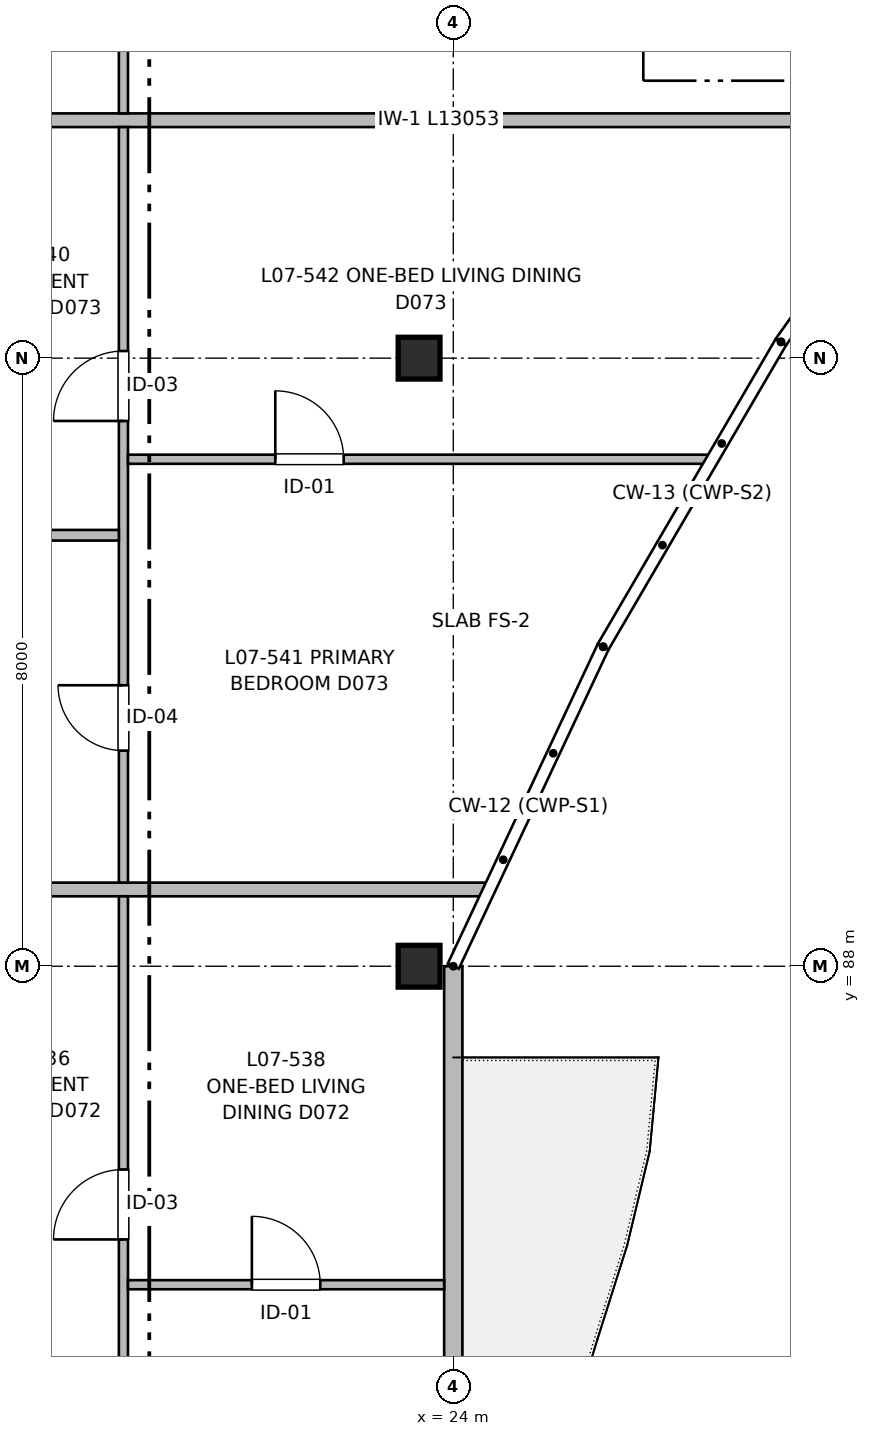
"""IFC4 building model, lengths in metres.
Left out: names, types, materials, properties, quantities, classifications, styles, units other than length and angle.
Written with IfcOpenShell. Run it as: python <this file> out.ifc"""

import sys

from ifc_helpers import new_model, si_unit, direction, frame, frame_2d, origin, origin_2d, place, context, subcontext, project, spatial, rectangle, extrude, element, fill, save


model = new_model("IFC4")
c1 = context("Model", 3, precision=1e-05, world=origin(), true_north=direction((0.0, 1.0)))
c2 = subcontext(c1, "Body", "Model", "MODEL_VIEW")
j1 = project(units=[si_unit("LENGTHUNIT", "METRE"), si_unit("PLANEANGLEUNIT", "RADIAN")], contexts=[c1])
p1 = place(None, origin())
s1 = spatial("IfcSite", under=j1, at=p1, CompositionType="ELEMENT")
p2 = place(p1, origin())
s2 = spatial("IfcBuilding", under=s1, at=p2, CompositionType="ELEMENT")
p3 = place(p2, frame((0.0, 0.0, 23.36)))
s3 = spatial("IfcBuildingStorey", under=s2, at=p3, CompositionType="ELEMENT", Elevation=23.36)
for number, where, z_axis, x_axis in (
    (1, (23.55, 88.0, 0.0), (0.0, 0.0, 1.0), (1.0, 0.0, 0.0)),
    (2, (23.55, 96.0, 0.0), (0.0, 0.0, 1.0), (1.0, 0.0, 0.0)),
):
    element("IfcColumn", number, at=place(p3, frame(where, z_axis=z_axis, x_axis=x_axis)), inside=s3, PredefinedType="COLUMN", context=c2, shape_type="SweptSolid", body=[
        extrude(rectangle(XDim=0.55, YDim=0.55, at=origin_2d()), origin(), (0.0, 0.0, 1.0), 3.2),
    ])
p4 = place(p3, frame((24.0, 88.0, 0.0), z_axis=(0.0, 0.0, 1.0), x_axis=(0.0, -1.0, 0.0)))
e3 = element("IfcWall", 3, at=p4, inside=s3, PredefinedType="SOLIDWALL", context=c2, shape_type="SweptSolid", body=[
    extrude(rectangle(XDim=23.6, YDim=0.24, at=frame_2d((11.8, 0.0))), origin(), (0.0, 0.0, 1.0), 2.98),
])
p5 = place(p4, frame((5.3, 0.0, 0.0)))
e4 = element("IfcOpeningElement", 4, at=p5, cuts=e3, PredefinedType="OPENING", context=c2, shape_type="SweptSolid", body=[
    extrude(rectangle(XDim=1.2, YDim=2.2, at=frame_2d((0.6, 1.1))), frame((0.0, 0.13, 0.0), z_axis=(0.0, -1.0, 0.0), x_axis=(1.0, 0.0, 0.0)), (0.0, 0.0, 1.0), 0.26),
])
p6 = place(p4, frame((7.2, 0.0, 0.67)))
e5 = element("IfcOpeningElement", 5, at=p6, cuts=e3, PredefinedType="OPENING", context=c2, shape_type="SweptSolid", body=[
    extrude(rectangle(XDim=2.6, YDim=1.55, at=frame_2d((1.3, 0.775))), frame((0.0, 0.13, 0.0), z_axis=(0.0, -1.0, 0.0), x_axis=(1.0, 0.0, 0.0)), (0.0, 0.0, 1.0), 0.26),
])
p7 = place(p4, frame((17.15, 0.0, 0.62)))
e6 = element("IfcOpeningElement", 6, at=p7, cuts=e3, PredefinedType="OPENING", context=c2, shape_type="SweptSolid", body=[
    extrude(rectangle(XDim=1.1, YDim=1.6, at=frame_2d((0.55, 0.8))), frame((0.0, 0.13, 0.0), z_axis=(0.0, -1.0, 0.0), x_axis=(1.0, 0.0, 0.0)), (0.0, 0.0, 1.0), 0.26),
])
p8 = place(p4, frame((11.925, 0.0, 0.82)))
e7 = element("IfcOpeningElement", 7, at=p8, cuts=e3, PredefinedType="OPENING", context=c2, shape_type="SweptSolid", body=[
    extrude(rectangle(XDim=1.5, YDim=1.4, at=frame_2d((0.75, 0.7))), frame((0.0, 0.13, 0.0), z_axis=(0.0, -1.0, 0.0), x_axis=(1.0, 0.0, 0.0)), (0.0, 0.0, 1.0), 0.26),
])
p9 = place(p3, frame((17.28, 89.01, 0.0), z_axis=(0.0, 0.0, 1.0), x_axis=(1.0, 0.0, 0.0)))
e8 = element("IfcWall", 8, at=p9, inside=s3, PredefinedType="PARTITIONING", context=c2, shape_type="SweptSolid", body=[
    extrude(rectangle(XDim=7.15, YDim=0.18, at=frame_2d((3.575, 0.0))), origin(), (0.0, 0.0, 1.0), 2.935),
])
p10 = place(p3, frame((17.28, 99.13, 0.0), z_axis=(0.0, 0.0, 1.0), x_axis=(1.0, 0.0, 0.0)))
e9 = element("IfcWall", 9, at=p10, inside=s3, PredefinedType="PARTITIONING", context=c2, shape_type="SweptSolid", body=[
    extrude(rectangle(XDim=13.053, YDim=0.18, at=frame_2d((6.527, 0.0))), origin(), (0.0, 0.0, 1.0), 2.935),
])
p11 = place(p3, frame((19.66, 77.3, 0.0), z_axis=(0.0, 0.0, 1.0), x_axis=(0.0, 1.0, 0.0)))
e10 = element("IfcWall", 10, at=p11, inside=s3, PredefinedType="PARTITIONING", context=c2, shape_type="SweptSolid", body=[
    extrude(rectangle(XDim=11.62, YDim=0.12, at=frame_2d((5.81, 0.0))), origin(), (0.0, 0.0, 1.0), 2.935),
])
p12 = place(p11, frame((2.033, 0.0, 0.0)))
e11 = element("IfcOpeningElement", 11, at=p12, cuts=e10, PredefinedType="OPENING", context=c2, shape_type="SweptSolid", body=[
    extrude(rectangle(XDim=0.94, YDim=2.1, at=frame_2d((0.47, 1.05))), frame((0.0, 0.07, 0.0), z_axis=(0.0, -1.0, 0.0), x_axis=(1.0, 0.0, 0.0)), (0.0, 0.0, 1.0), 0.14),
])
p13 = place(p11, frame((7.106, 0.0, 0.0)))
e12 = element("IfcOpeningElement", 12, at=p13, cuts=e10, PredefinedType="OPENING", context=c2, shape_type="SweptSolid", body=[
    extrude(rectangle(XDim=0.92, YDim=2.1, at=frame_2d((0.46, 1.05))), frame((0.0, 0.07, 0.0), z_axis=(0.0, -1.0, 0.0), x_axis=(1.0, 0.0, 0.0)), (0.0, 0.0, 1.0), 0.14),
])
p14 = place(p3, frame((19.72, 83.81, 0.0), z_axis=(0.0, 0.0, 1.0), x_axis=(1.0, 0.0, 0.0)))
e13 = element("IfcWall", 13, at=p14, inside=s3, PredefinedType="PARTITIONING", context=c2, shape_type="SweptSolid", body=[
    extrude(rectangle(XDim=4.16, YDim=0.12, at=frame_2d((2.08, 0.0))), origin(), (0.0, 0.0, 1.0), 2.935),
])
p15 = place(p14, frame((1.63, 0.0, 0.0)))
e14 = element("IfcOpeningElement", 14, at=p15, cuts=e13, PredefinedType="OPENING", context=c2, shape_type="SweptSolid", body=[
    extrude(rectangle(XDim=0.9, YDim=2.1, at=frame_2d((0.45, 1.05))), frame((0.0, 0.07, 0.0), z_axis=(0.0, -1.0, 0.0), x_axis=(1.0, 0.0, 0.0)), (0.0, 0.0, 1.0), 0.14),
])
p16 = place(p3, frame((19.66, 89.1, 0.0), z_axis=(0.0, 0.0, 1.0), x_axis=(0.0, 1.0, 0.0)))
e15 = element("IfcWall", 15, at=p16, inside=s3, PredefinedType="PARTITIONING", context=c2, shape_type="SweptSolid", body=[
    extrude(rectangle(XDim=9.94, YDim=0.12, at=frame_2d((4.97, 0.0))), origin(), (0.0, 0.0, 1.0), 2.935),
])
p17 = place(p16, frame((1.737, 0.0, 0.0)))
e16 = element("IfcOpeningElement", 16, at=p17, cuts=e15, PredefinedType="OPENING", context=c2, shape_type="SweptSolid", body=[
    extrude(rectangle(XDim=0.86, YDim=2.1, at=frame_2d((0.43, 1.05))), frame((0.0, 0.07, 0.0), z_axis=(0.0, -1.0, 0.0), x_axis=(1.0, 0.0, 0.0)), (0.0, 0.0, 1.0), 0.14),
])
p18 = place(p16, frame((6.073, 0.0, 0.0)))
e17 = element("IfcOpeningElement", 17, at=p18, cuts=e15, PredefinedType="OPENING", context=c2, shape_type="SweptSolid", body=[
    extrude(rectangle(XDim=0.92, YDim=2.1, at=frame_2d((0.46, 1.05))), frame((0.0, 0.07, 0.0), z_axis=(0.0, -1.0, 0.0), x_axis=(1.0, 0.0, 0.0)), (0.0, 0.0, 1.0), 0.14),
])
p19 = place(p3, frame((17.28, 93.67, 0.0), z_axis=(0.0, 0.0, 1.0), x_axis=(1.0, 0.0, 0.0)))
e18 = element("IfcWall", 18, at=p19, inside=s3, PredefinedType="PARTITIONING", context=c2, shape_type="SweptSolid", body=[
    extrude(rectangle(XDim=2.32, YDim=0.14, at=frame_2d((1.16, 0.0))), origin(), (0.0, 0.0, 1.0), 2.935),
])
p20 = place(p3, frame((19.72, 94.67, 0.0), z_axis=(0.0, 0.0, 1.0), x_axis=(1.0, 0.0, 0.0)))
e19 = element("IfcWall", 19, at=p20, inside=s3, PredefinedType="PARTITIONING", context=c2, shape_type="SweptSolid", body=[
    extrude(rectangle(XDim=7.645, YDim=0.12, at=frame_2d((3.823, 0.0))), origin(), (0.0, 0.0, 1.0), 2.935),
])
p21 = place(p20, frame((1.938, 0.0, 0.0)))
e20 = element("IfcOpeningElement", 20, at=p21, cuts=e19, PredefinedType="OPENING", context=c2, shape_type="SweptSolid", body=[
    extrude(rectangle(XDim=0.9, YDim=2.1, at=frame_2d((0.45, 1.05))), frame((0.0, 0.07, 0.0), z_axis=(0.0, -1.0, 0.0), x_axis=(1.0, 0.0, 0.0)), (0.0, 0.0, 1.0), 0.14),
])
p22 = place(p3, frame((19.66, 99.22, 0.0), z_axis=(0.0, 0.0, 1.0), x_axis=(0.0, 1.0, 0.0)))
e21 = element("IfcWall", 21, at=p22, inside=s3, PredefinedType="PARTITIONING", context=c2, shape_type="SweptSolid", body=[
    extrude(rectangle(XDim=7.5, YDim=0.12, at=frame_2d((3.75, 0.0))), origin(), (0.0, 0.0, 1.0), 2.935),
])
p23 = place(p22, frame((1.311, 0.0, 0.0)))
e22 = element("IfcOpeningElement", 22, at=p23, cuts=e21, PredefinedType="OPENING", context=c2, shape_type="SweptSolid", body=[
    extrude(rectangle(XDim=0.86, YDim=2.1, at=frame_2d((0.43, 1.05))), frame((0.0, 0.07, 0.0), z_axis=(0.0, -1.0, 0.0), x_axis=(1.0, 0.0, 0.0)), (0.0, 0.0, 1.0), 0.14),
])
p24 = place(p22, frame((4.584, 0.0, 0.0)))
e23 = element("IfcOpeningElement", 23, at=p24, cuts=e21, PredefinedType="OPENING", context=c2, shape_type="SweptSolid", body=[
    extrude(rectangle(XDim=0.92, YDim=2.1, at=frame_2d((0.46, 1.05))), frame((0.0, 0.07, 0.0), z_axis=(0.0, -1.0, 0.0), x_axis=(1.0, 0.0, 0.0)), (0.0, 0.0, 1.0), 0.14),
])
p25 = place(p13, origin())
e24 = element("IfcDoor", 24, at=p25, inside=s3, OperationType="SINGLE_SWING_LEFT", PredefinedType="DOOR", context=c2, shape_type="SweptSolid", body=[
    extrude(rectangle(XDim=0.92, YDim=2.1, at=frame_2d((0.46, 1.05))), frame((0.0, 0.025, 0.0), z_axis=(0.0, -1.0, 0.0), x_axis=(1.0, 0.0, 0.0)), (0.0, 0.0, 1.0), 0.05),
])
fill(e12, e24)
p26 = place(p15, origin())
e25 = element("IfcDoor", 25, at=p26, inside=s3, OperationType="SINGLE_SWING_LEFT", PredefinedType="DOOR", context=c2, shape_type="SweptSolid", body=[
    extrude(rectangle(XDim=0.9, YDim=2.1, at=frame_2d((0.45, 1.05))), frame((0.0, 0.025, 0.0), z_axis=(0.0, -1.0, 0.0), x_axis=(1.0, 0.0, 0.0)), (0.0, 0.0, 1.0), 0.05),
])
fill(e14, e25)
p27 = place(p17, origin())
e26 = element("IfcDoor", 26, at=p27, inside=s3, OperationType="SINGLE_SWING_RIGHT", PredefinedType="DOOR", context=c2, shape_type="SweptSolid", body=[
    extrude(rectangle(XDim=0.86, YDim=2.1, at=frame_2d((0.43, 1.05))), frame((0.0, 0.025, 0.0), z_axis=(0.0, -1.0, 0.0), x_axis=(1.0, 0.0, 0.0)), (0.0, 0.0, 1.0), 0.05),
])
fill(e16, e26)
p28 = place(p18, origin())
e27 = element("IfcDoor", 27, at=p28, inside=s3, OperationType="SINGLE_SWING_LEFT", PredefinedType="DOOR", context=c2, shape_type="SweptSolid", body=[
    extrude(rectangle(XDim=0.92, YDim=2.1, at=frame_2d((0.46, 1.05))), frame((0.0, 0.025, 0.0), z_axis=(0.0, -1.0, 0.0), x_axis=(1.0, 0.0, 0.0)), (0.0, 0.0, 1.0), 0.05),
])
fill(e17, e27)
p29 = place(p21, origin())
e28 = element("IfcDoor", 28, at=p29, inside=s3, OperationType="SINGLE_SWING_LEFT", PredefinedType="DOOR", context=c2, shape_type="SweptSolid", body=[
    extrude(rectangle(XDim=0.9, YDim=2.1, at=frame_2d((0.45, 1.05))), frame((0.0, 0.025, 0.0), z_axis=(0.0, -1.0, 0.0), x_axis=(1.0, 0.0, 0.0)), (0.0, 0.0, 1.0), 0.05),
])
fill(e20, e28)
save(model, sys.argv[1])
